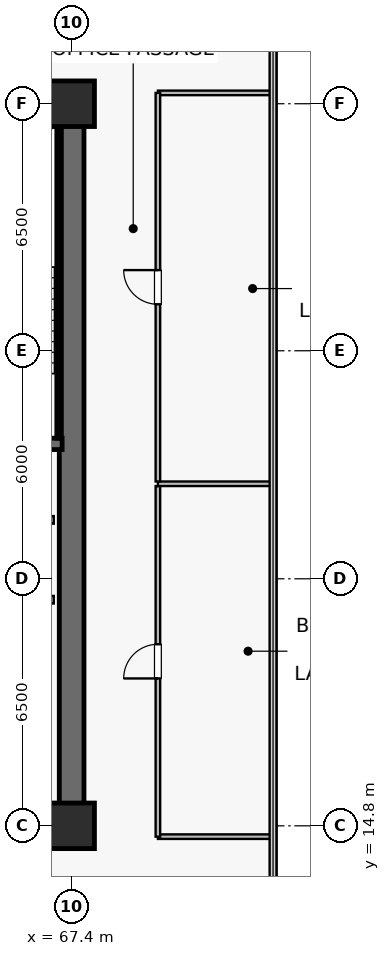
"""IFC4 building model, lengths in metres.
Left out: names, types, materials, properties, quantities, classifications, styles, units other than length and angle.
Written with IfcOpenShell. Run it as: python <this file> out.ifc"""

import sys

from ifc_helpers import new_model, si_unit, direction, frame, frame_2d, origin, origin_2d, place, context, subcontext, project, spatial, rectangle, extrude, source, transform, mapped, element, fill, save


model = new_model("IFC4")
c1 = context("Model", 3, precision=1e-05, world=origin(), true_north=direction((0.0, 1.0)))
c2 = subcontext(c1, "Body", "Model", "MODEL_VIEW")
j1 = project(units=[si_unit("LENGTHUNIT", "METRE"), si_unit("PLANEANGLEUNIT", "RADIAN")], contexts=[c1])
p1 = place(None, origin())
s1 = spatial("IfcSite", under=j1, at=p1, CompositionType="ELEMENT")
p2 = place(p1, origin())
s2 = spatial("IfcBuilding", under=s1, at=p2, CompositionType="ELEMENT")
p3 = place(p2, frame((0.0, 0.0, 137.9)))
s3 = spatial("IfcBuildingStorey", under=s2, at=p3, CompositionType="ELEMENT", Elevation=137.9)
p4 = place(p3, frame((52.275, 14.8, 0.0), z_axis=(0.0, 0.0, 1.0), x_axis=(1.0, 0.0, 0.0)))
e1 = element("IfcWall", 1, at=p4, inside=s3, PredefinedType="SHEAR", context=c2, shape_type="SweptSolid", body=[
    extrude(rectangle(XDim=15.45, YDim=0.65, at=frame_2d((7.725, 0.0))), origin(), (0.0, 0.0, 1.0), 3.79),
])
p5 = place(p3, frame((52.275, 33.8, 0.0), z_axis=(0.0, 0.0, 1.0), x_axis=(1.0, 0.0, 0.0)))
e2 = element("IfcWall", 2, at=p5, inside=s3, PredefinedType="SHEAR", context=c2, shape_type="SweptSolid", body=[
    extrude(rectangle(XDim=15.45, YDim=0.65, at=frame_2d((7.725, 0.0))), origin(), (0.0, 0.0, 1.0), 3.79),
])
p6 = place(p5, frame((9.25, 0.0, 0.0)))
e3 = element("IfcOpeningElement", 3, at=p6, cuts=e2, PredefinedType="OPENING", context=c2, shape_type="SweptSolid", body=[
    extrude(rectangle(XDim=0.95, YDim=2.15, at=frame_2d((0.475, 1.075))), frame((0.0, 0.335, 0.0), z_axis=(0.0, -1.0, 0.0), x_axis=(1.0, 0.0, 0.0)), (0.0, 0.0, 1.0), 0.67),
])
p7 = place(p5, frame((6.735, 0.0, 0.0)))
e4 = element("IfcOpeningElement", 4, at=p7, cuts=e2, PredefinedType="OPENING", context=c2, shape_type="SweptSolid", body=[
    extrude(rectangle(XDim=0.95, YDim=2.15, at=frame_2d((0.475, 1.075))), frame((0.0, 0.335, 0.0), z_axis=(0.0, -1.0, 0.0), x_axis=(1.0, 0.0, 0.0)), (0.0, 0.0, 1.0), 0.67),
])
p8 = place(p5, frame((4.185, 0.0, 0.0)))
e5 = element("IfcOpeningElement", 5, at=p8, cuts=e2, PredefinedType="OPENING", context=c2, shape_type="SweptSolid", body=[
    extrude(rectangle(XDim=0.95, YDim=2.15, at=frame_2d((0.475, 1.075))), frame((0.0, 0.335, 0.0), z_axis=(0.0, -1.0, 0.0), x_axis=(1.0, 0.0, 0.0)), (0.0, 0.0, 1.0), 0.67),
])
p9 = place(p5, frame((1.635, 0.0, 0.0)))
e6 = element("IfcOpeningElement", 6, at=p9, cuts=e2, PredefinedType="OPENING", context=c2, shape_type="SweptSolid", body=[
    extrude(rectangle(XDim=0.95, YDim=2.15, at=frame_2d((0.475, 1.075))), frame((0.0, 0.335, 0.0), z_axis=(0.0, -1.0, 0.0), x_axis=(1.0, 0.0, 0.0)), (0.0, 0.0, 1.0), 0.67),
])
p10 = place(p3, frame((67.4, 15.125, 0.0), z_axis=(0.0, 0.0, 1.0), x_axis=(0.0, 1.0, 0.0)))
e7 = element("IfcWall", 7, at=p10, inside=s3, PredefinedType="SHEAR", context=c2, shape_type="SweptSolid", body=[
    extrude(rectangle(XDim=18.35, YDim=0.65, at=frame_2d((9.175, 0.0))), origin(), (0.0, 0.0, 1.0), 3.79),
])
p11 = place(p3, frame((63.35, 24.85, 0.0), z_axis=(0.0, 0.0, 1.0), x_axis=(1.0, 0.0, 0.0)))
e8 = element("IfcWall", 8, at=p11, inside=s3, PredefinedType="SHEAR", context=c2, shape_type="SweptSolid", body=[
    extrude(rectangle(XDim=3.8, YDim=0.3, at=frame_2d((1.9, 0.0))), origin(), (0.0, 0.0, 1.0), 3.79),
])
p12 = place(p3, frame((63.35, 33.4, 0.0), z_axis=(0.0, 0.0, 1.0), x_axis=(1.0, 0.0, 0.0)))
e9 = element("IfcWall", 9, at=p12, inside=s3, PredefinedType="SOLIDWALL", context=c2, shape_type="SweptSolid", body=[
    extrude(rectangle(XDim=3.72, YDim=0.12, at=frame_2d((1.86, 0.0))), origin(), (0.0, 0.0, 1.0), 3.79),
])
p13 = place(p3, frame((67.07, 25.0, 0.0), z_axis=(0.0, 0.0, 1.0), x_axis=(0.0, 1.0, 0.0)))
e10 = element("IfcWall", 10, at=p13, inside=s3, PredefinedType="SOLIDWALL", context=c2, shape_type="SweptSolid", body=[
    extrude(rectangle(XDim=8.32, YDim=0.12, at=frame_2d((4.16, 0.0))), origin(), (0.0, 0.0, 1.0), 3.79),
])
m1 = source(origin(), c2, "Body", "SweptSolid", [
    extrude(rectangle(XDim=1.2, YDim=1.2, at=origin_2d()), origin(), (0.0, 0.0, 1.0), 4.1),
])
for number, where, z_axis, x_axis in (
    (11, (67.4, 14.8, 0.0), (0.0, 0.0, 1.0), (1.0, 0.0, 0.0)),
    (12, (67.4, 33.8, 0.0), (0.0, 0.0, 1.0), (1.0, 0.0, 0.0)),
):
    element("IfcColumn", number, at=place(p3, frame(where, z_axis=z_axis, x_axis=x_axis)), inside=s3, PredefinedType="COLUMN", context=c2, shape_type="MappedRepresentation", body=[
        mapped(m1, transform((0.0, 0.0, 0.0), scale=1.0)),
    ])
for number, where, z_axis, x_axis in (
    (13, (64.67, 20.75, 0.0), (0.0, 0.0, 1.0), (1.0, 0.0, 0.0)),
    (14, (64.67, 22.85, 0.0), (0.0, 0.0, 1.0), (1.0, 0.0, 0.0)),
):
    element("IfcWall", number, at=place(p3, frame(where, z_axis=z_axis, x_axis=x_axis)), inside=s3, PredefinedType="SOLIDWALL", context=c2, shape_type="SweptSolid", body=[
        extrude(rectangle(XDim=2.26, YDim=0.2, at=frame_2d((1.13, 0.0))), origin(), (0.0, 0.0, 1.0), 3.79),
    ])
for number, where, z_axis, x_axis in (
    (15, (69.67, 14.515, 0.0), (0.0, 0.0, 1.0), (1.0, 0.0, 0.0)),
    (16, (69.67, 34.085, 0.0), (0.0, 0.0, 1.0), (1.0, 0.0, 0.0)),
):
    element("IfcWall", number, at=place(p3, frame(where, z_axis=z_axis, x_axis=x_axis)), inside=s3, PredefinedType="PARTITIONING", context=c2, shape_type="SweptSolid", body=[
        extrude(rectangle(XDim=3.02, YDim=0.12, at=frame_2d((1.51, 0.0))), origin(), (0.0, 0.0, 1.0), 3.79),
    ])
p14 = place(p3, frame((69.67, 14.515, 0.0), z_axis=(0.0, 0.0, 1.0), x_axis=(0.0, 1.0, 0.0)))
e17 = element("IfcWall", 17, at=p14, inside=s3, PredefinedType="PARTITIONING", context=c2, shape_type="SweptSolid", body=[
    extrude(rectangle(XDim=9.225, YDim=0.12, at=frame_2d((4.613, 0.0))), origin(), (0.0, 0.0, 1.0), 3.79),
])
p15 = place(p14, frame((4.163, 0.0, 0.0)))
e18 = element("IfcOpeningElement", 18, at=p15, cuts=e17, PredefinedType="OPENING", context=c2, shape_type="SweptSolid", body=[
    extrude(rectangle(XDim=0.9, YDim=2.1, at=frame_2d((0.45, 1.05))), frame((0.0, 0.07, 0.0), z_axis=(0.0, -1.0, 0.0), x_axis=(1.0, 0.0, 0.0)), (0.0, 0.0, 1.0), 0.14),
])
p16 = place(p3, frame((69.67, 23.8, 0.0), z_axis=(0.0, 0.0, 1.0), x_axis=(1.0, 0.0, 0.0)))
e19 = element("IfcWall", 19, at=p16, inside=s3, PredefinedType="PARTITIONING", context=c2, shape_type="SweptSolid", body=[
    extrude(rectangle(XDim=3.02, YDim=0.12, at=frame_2d((1.51, 0.0))), origin(), (0.0, 0.0, 1.0), 3.79),
])
p17 = place(p3, frame((69.67, 23.86, 0.0), z_axis=(0.0, 0.0, 1.0), x_axis=(0.0, 1.0, 0.0)))
e20 = element("IfcWall", 20, at=p17, inside=s3, PredefinedType="PARTITIONING", context=c2, shape_type="SweptSolid", body=[
    extrude(rectangle(XDim=10.225, YDim=0.12, at=frame_2d((5.112, 0.0))), origin(), (0.0, 0.0, 1.0), 3.79),
])
p18 = place(p17, frame((4.663, 0.0, 0.0)))
e21 = element("IfcOpeningElement", 21, at=p18, cuts=e20, PredefinedType="OPENING", context=c2, shape_type="SweptSolid", body=[
    extrude(rectangle(XDim=0.9, YDim=2.1, at=frame_2d((0.45, 1.05))), frame((0.0, 0.07, 0.0), z_axis=(0.0, -1.0, 0.0), x_axis=(1.0, 0.0, 0.0)), (0.0, 0.0, 1.0), 0.14),
])
m2 = source(origin(), c2, "Body", "SweptSolid", [
    extrude(rectangle(XDim=0.9, YDim=2.1, at=frame_2d((0.45, 1.05))), frame((0.0, 0.025, 0.0), z_axis=(0.0, -1.0, 0.0), x_axis=(1.0, 0.0, 0.0)), (0.0, 0.0, 1.0), 0.05),
])
p19 = place(p15, origin())
e22 = element("IfcDoor", 22, at=p19, inside=s3, OperationType="SINGLE_SWING_LEFT", PredefinedType="DOOR", context=c2, shape_type="MappedRepresentation", body=[
    mapped(m2, transform((0.0, 0.0, 0.0), scale=1.0)),
])
fill(e18, e22)
p20 = place(p18, origin())
e23 = element("IfcDoor", 23, at=p20, inside=s3, OperationType="SINGLE_SWING_RIGHT", PredefinedType="DOOR", context=c2, shape_type="MappedRepresentation", body=[
    mapped(m2, transform((0.0, 0.0, 0.0), scale=1.0)),
])
fill(e21, e23)
save(model, sys.argv[1])
